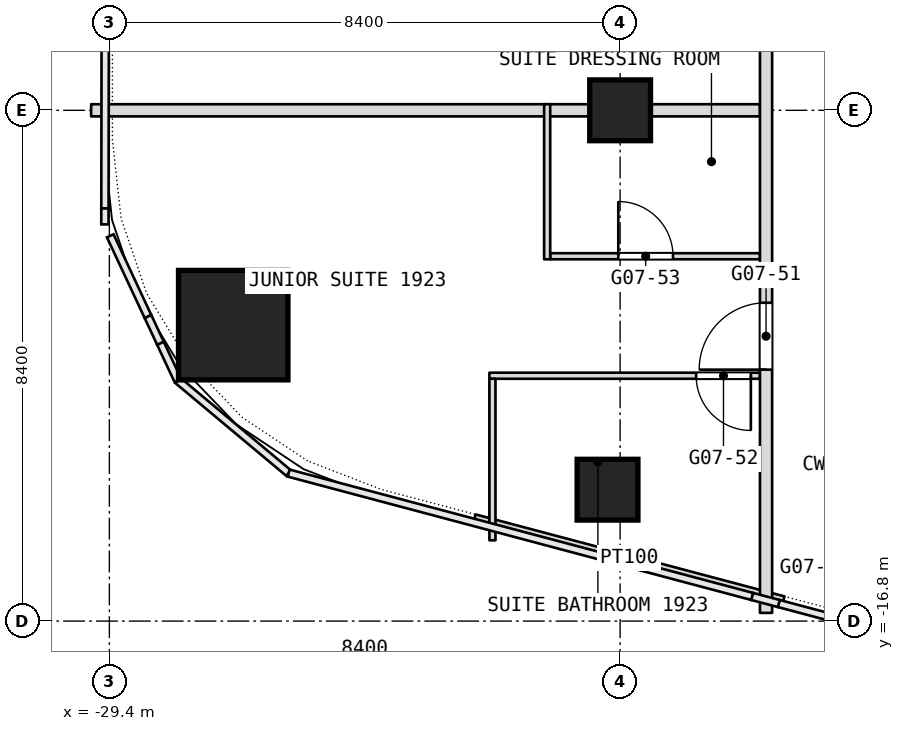
"""IFC4 building model, lengths in metres.
Left out: names, types, materials, properties, quantities, classifications, styles, units other than length and angle.
Written with IfcOpenShell. Run it as: python <this file> out.ifc"""

import sys

from ifc_helpers import new_model, si_unit, direction, frame, frame_2d, origin, origin_2d, place, context, subcontext, project, spatial, rectangle, extrude, element, fill, save


model = new_model("IFC4")
c1 = context("Model", 3, precision=1e-05, world=origin(), true_north=direction((0.0, 1.0)))
c2 = subcontext(c1, "Body", "Model", "MODEL_VIEW")
j1 = project(units=[si_unit("LENGTHUNIT", "METRE"), si_unit("PLANEANGLEUNIT", "RADIAN")], contexts=[c1])
p1 = place(None, origin())
s1 = spatial("IfcSite", under=j1, at=p1, CompositionType="ELEMENT")
p2 = place(p1, origin())
s2 = spatial("IfcBuilding", under=s1, at=p2, CompositionType="ELEMENT")
p3 = place(p2, frame((0.0, 0.0, 83.3)))
s3 = spatial("IfcBuildingStorey", under=s2, at=p3, CompositionType="ELEMENT", Elevation=83.3)
p4 = place(p3, frame((-27.363, -11.933, 0.0), z_axis=(0.0, 0.0, 1.0), x_axis=(1.0, 0.0, 0.0)))
e1 = element("IfcColumn", 1, at=p4, inside=s3, PredefinedType="COLUMN", context=c2, shape_type="SweptSolid", body=[
    extrude(rectangle(XDim=1.8, YDim=1.8, at=origin_2d()), origin(), (0.0, 0.0, 1.0), 3.6),
])
for number, where, z_axis, x_axis in (
    (2, (-21.0, -8.4, 0.0), (0.0, 0.0, 1.0), (1.0, 0.0, 0.0)),
    (3, (-21.207, -14.639, 0.0), (0.0, 0.0, 1.0), (1.0, 0.0, 0.0)),
):
    element("IfcColumn", number, at=place(p3, frame(where, z_axis=z_axis, x_axis=x_axis)), inside=s3, PredefinedType="COLUMN", context=c2, shape_type="SweptSolid", body=[
        extrude(rectangle(XDim=1.0, YDim=1.0, at=origin_2d()), origin(), (0.0, 0.0, 1.0), 3.6),
    ])
p5 = place(p3, frame((-23.39, -15.094, 0.0), z_axis=(0.0, 0.0, 1.0), x_axis=(0.966552628131, -0.256468354876, 0.0)))
e4 = element("IfcWall", 4, at=p5, inside=s3, PredefinedType="PARTITIONING", context=c2, shape_type="SweptSolid", body=[
    extrude(rectangle(XDim=5.256, YDim=0.1, at=frame_2d((2.628, 0.0))), origin(), (0.0, 0.0, 1.0), 3.3),
])
p6 = place(p3, frame((-23.15, -12.765, 0.0), z_axis=(0.0, 0.0, 1.0), x_axis=(1.0, 0.0, 0.0)))
e5 = element("IfcWall", 5, at=p6, inside=s3, PredefinedType="PARTITIONING", context=c2, shape_type="SweptSolid", body=[
    extrude(rectangle(XDim=4.45, YDim=0.1, at=frame_2d((2.225, 0.0))), origin(), (0.0, 0.0, 1.0), 3.3),
])
p7 = place(p6, frame((3.4, 0.0, 0.0)))
e6 = element("IfcOpeningElement", 6, at=p7, cuts=e5, PredefinedType="OPENING", context=c2, shape_type="SweptSolid", body=[
    extrude(rectangle(XDim=0.9, YDim=2.1, at=frame_2d((0.45, 1.05))), frame((0.0, 0.05, 0.0), z_axis=(0.0, -1.0, 0.0), x_axis=(1.0, 0.0, 0.0)), (0.0, 0.0, 1.0), 0.1),
])
p8 = place(p3, frame((-22.15, -10.8, 0.0), z_axis=(0.0, 0.0, 1.0), x_axis=(1.0, 0.0, 0.0)))
e7 = element("IfcWall", 7, at=p8, inside=s3, PredefinedType="PARTITIONING", context=c2, shape_type="SweptSolid", body=[
    extrude(rectangle(XDim=3.45, YDim=0.1, at=frame_2d((1.725, 0.0))), origin(), (0.0, 0.0, 1.0), 3.3),
])
p9 = place(p8, frame((1.12, 0.0, 0.0)))
e8 = element("IfcOpeningElement", 8, at=p9, cuts=e7, PredefinedType="OPENING", context=c2, shape_type="SweptSolid", body=[
    extrude(rectangle(XDim=0.9, YDim=2.1, at=frame_2d((0.45, 1.05))), frame((0.0, 0.05, 0.0), z_axis=(0.0, -1.0, 0.0), x_axis=(1.0, 0.0, 0.0)), (0.0, 0.0, 1.0), 0.1),
])
p10 = place(p3, frame((-29.7, -8.4, 0.0), z_axis=(0.0, 0.0, 1.0), x_axis=(1.0, 0.0, 0.0)))
e9 = element("IfcWall", 9, at=p10, inside=s3, PredefinedType="PARTITIONING", context=c2, shape_type="SweptSolid", body=[
    extrude(rectangle(XDim=11.0, YDim=0.2, at=frame_2d((5.5, 0.0))), origin(), (0.0, 0.0, 1.0), 2.8),
])
p11 = place(p3, frame((-18.6, -16.665, 0.0), z_axis=(0.0, 0.0, 1.0), x_axis=(0.0, 1.0, 0.0)))
e10 = element("IfcWall", 10, at=p11, inside=s3, PredefinedType="PARTITIONING", context=c2, shape_type="SweptSolid", body=[
    extrude(rectangle(XDim=23.565, YDim=0.2, at=frame_2d((11.782, 0.0))), origin(), (0.0, 0.0, 1.0), 3.3),
])
p12 = place(p11, frame((4.0, 0.0, 0.0)))
e11 = element("IfcOpeningElement", 11, at=p12, cuts=e10, PredefinedType="OPENING", context=c2, shape_type="SweptSolid", body=[
    extrude(rectangle(XDim=1.1, YDim=2.1, at=frame_2d((0.55, 1.05))), frame((0.0, 0.1, 0.0), z_axis=(0.0, -1.0, 0.0), x_axis=(1.0, 0.0, 0.0)), (0.0, 0.0, 1.0), 0.2),
])
p13 = place(p11, frame((11.565, 0.0, 0.0)))
e12 = element("IfcOpeningElement", 12, at=p13, cuts=e10, PredefinedType="OPENING", context=c2, shape_type="SweptSolid", body=[
    extrude(rectangle(XDim=1.8, YDim=2.1, at=frame_2d((0.9, 1.05))), frame((0.0, 0.1, 0.0), z_axis=(0.0, -1.0, 0.0), x_axis=(1.0, 0.0, 0.0)), (0.0, 0.0, 1.0), 0.2),
])
p14 = place(p11, frame((19.965, 0.0, 0.0)))
e13 = element("IfcOpeningElement", 13, at=p14, cuts=e10, PredefinedType="OPENING", context=c2, shape_type="SweptSolid", body=[
    extrude(rectangle(XDim=1.8, YDim=2.1, at=frame_2d((0.9, 1.05))), frame((0.0, 0.1, 0.0), z_axis=(0.0, -1.0, 0.0), x_axis=(1.0, 0.0, 0.0)), (0.0, 0.0, 1.0), 0.2),
])
p15 = place(p3, frame((-22.2, -10.85, 0.0), z_axis=(0.0, 0.0, 1.0), x_axis=(0.0, 1.0, 0.0)))
e14 = element("IfcWall", 14, at=p15, inside=s3, PredefinedType="PARTITIONING", context=c2, shape_type="SweptSolid", body=[
    extrude(rectangle(XDim=2.55, YDim=0.1, at=frame_2d((1.275, 0.0))), origin(), (0.0, 0.0, 1.0), 3.3),
])
p16 = place(p3, frame((-23.1, -15.471, 0.0), z_axis=(0.0, 0.0, 1.0), x_axis=(0.0, 1.0, 0.0)))
e15 = element("IfcWall", 15, at=p16, inside=s3, PredefinedType="PARTITIONING", context=c2, shape_type="SweptSolid", body=[
    extrude(rectangle(XDim=2.656, YDim=0.1, at=frame_2d((1.328, 0.0))), origin(), (0.0, 0.0, 1.0), 3.3),
])
p17 = place(p7, origin())
e16 = element("IfcDoor", 16, at=p17, inside=s3, OperationType="SINGLE_SWING_LEFT", PredefinedType="DOOR", context=c2, shape_type="SweptSolid", body=[
    extrude(rectangle(XDim=0.9, YDim=2.1, at=frame_2d((0.45, 1.05))), frame((0.0, 0.025, 0.0), z_axis=(0.0, -1.0, 0.0), x_axis=(1.0, 0.0, 0.0)), (0.0, 0.0, 1.0), 0.05),
])
fill(e6, e16)
p18 = place(p9, origin())
e17 = element("IfcDoor", 17, at=p18, inside=s3, OperationType="SINGLE_SWING_LEFT", PredefinedType="DOOR", context=c2, shape_type="SweptSolid", body=[
    extrude(rectangle(XDim=0.9, YDim=2.1, at=frame_2d((0.45, 1.05))), frame((0.0, 0.025, 0.0), z_axis=(0.0, -1.0, 0.0), x_axis=(1.0, 0.0, 0.0)), (0.0, 0.0, 1.0), 0.05),
])
fill(e8, e17)
p19 = place(p12, origin())
e18 = element("IfcDoor", 18, at=p19, inside=s3, OperationType="SINGLE_SWING_LEFT", PredefinedType="DOOR", context=c2, shape_type="SweptSolid", body=[
    extrude(rectangle(XDim=1.1, YDim=2.1, at=frame_2d((0.55, 1.05))), frame((0.0, 0.025, 0.0), z_axis=(0.0, -1.0, 0.0), x_axis=(1.0, 0.0, 0.0)), (0.0, 0.0, 1.0), 0.05),
])
fill(e11, e18)
save(model, sys.argv[1])
